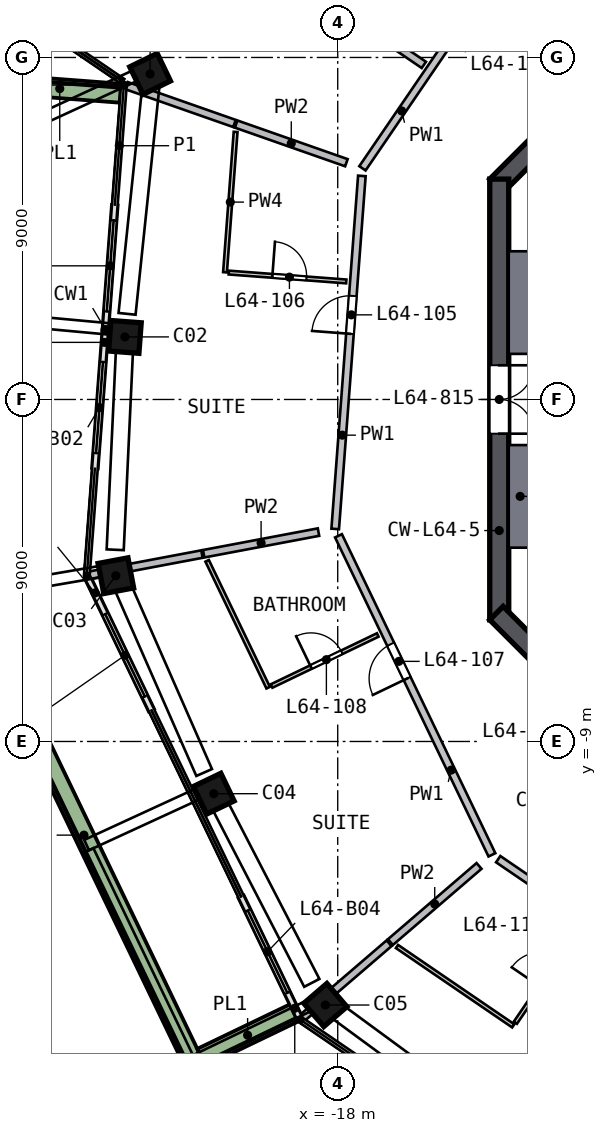
"""IFC4 building model, lengths in metres.
Left out: names, types, materials, properties, quantities, classifications, styles, units other than length and angle.
Written with IfcOpenShell. Run it as: python <this file> out.ifc"""

import sys

from ifc_helpers import new_model, si_unit, direction, frame, frame_2d, origin, origin_2d, place, context, subcontext, project, spatial, polyline, rectangle, outline, extrude, element, fill, save


model = new_model("IFC4")
c1 = context("Model", 3, precision=1e-05, world=origin(), true_north=direction((0.0, 1.0)))
c2 = subcontext(c1, "Body", "Model", "MODEL_VIEW")
j1 = project(units=[si_unit("LENGTHUNIT", "METRE"), si_unit("PLANEANGLEUNIT", "RADIAN")], contexts=[c1])
p1 = place(None, origin())
s1 = spatial("IfcSite", under=j1, at=p1, CompositionType="ELEMENT")
p2 = place(p1, origin())
s2 = spatial("IfcBuilding", under=s1, at=p2, CompositionType="ELEMENT")
p3 = place(p2, frame((0.0, 0.0, 259.5)))
s3 = spatial("IfcBuildingStorey", under=s2, at=p3, CompositionType="ELEMENT", Elevation=259.5)
p4 = place(p3, frame((-22.888, 8.699, 0.0), z_axis=(-0.040413341, -0.109196848, 0.993198273), x_axis=(-0.438378748, 0.895170757, 0.080581569)))
e1 = element("IfcColumn", 1, at=p4, inside=s3, PredefinedType="COLUMN", context=c2, shape_type="SweptSolid", body=[
    extrude(rectangle(XDim=0.8, YDim=0.8, at=origin_2d()), origin(), (0.0, 0.0, 1.0), 3.021),
])
p5 = place(p3, frame((-23.591, 1.782, 0.0), z_axis=(-0.007601181, -0.112238709, 0.9936522), x_axis=(-0.075549588, -0.990776389, -0.112491804)))
e2 = element("IfcColumn", 2, at=p5, inside=s3, PredefinedType="COLUMN", context=c2, shape_type="SweptSolid", body=[
    extrude(rectangle(XDim=0.8, YDim=0.8, at=origin_2d()), origin(), (0.0, 0.0, 1.0), 3.019),
])
p6 = place(p3, frame((-23.865, -4.501, 0.0), z_axis=(0.022391395, -0.113331177, 0.993304923), x_axis=(-0.184250053, 0.976067383, 0.115517882)))
e3 = element("IfcColumn", 3, at=p6, inside=s3, PredefinedType="COLUMN", context=c2, shape_type="SweptSolid", body=[
    extrude(rectangle(XDim=0.8, YDim=0.8, at=origin_2d()), origin(), (0.0, 0.0, 1.0), 3.02),
])
p7 = place(p3, frame((-21.322, -10.252, 0.0), z_axis=(0.049569338, -0.100998536, 0.993650933), x_axis=(0.430206945, -0.895692503, -0.112502994)))
e4 = element("IfcColumn", 4, at=p7, inside=s3, PredefinedType="COLUMN", context=c2, shape_type="SweptSolid", body=[
    extrude(rectangle(XDim=0.8, YDim=0.8, at=origin_2d()), origin(), (0.0, 0.0, 1.0), 3.019),
])
p8 = place(p3, frame((-18.417, -15.83, 0.0), z_axis=(0.075985477, -0.086979121, 0.993308029), x_axis=(-0.647132727, 0.75357881, 0.115491175)))
e5 = element("IfcColumn", 5, at=p8, inside=s3, PredefinedType="COLUMN", context=c2, shape_type="SweptSolid", body=[
    extrude(rectangle(XDim=0.8, YDim=0.8, at=origin_2d()), origin(), (0.0, 0.0, 1.0), 3.02),
])
p9 = place(p3, frame((-5.622, 13.823, 0.0), z_axis=(0.0, 0.0, 1.0), x_axis=(-0.707106781, -0.707106781, 0.0)))
e6 = element("IfcWall", 6, at=p9, inside=s3, PredefinedType="SHEAR", context=c2, shape_type="SweptSolid", body=[
    extrude(rectangle(XDim=11.598, YDim=0.5, at=frame_2d((5.799, 0.0))), origin(), (0.0, 0.0, 1.0), 3.5),
])
p10 = place(p3, frame((-13.75, 5.799, 0.0), z_axis=(0.0, 0.0, 1.0), x_axis=(0.0, -1.0, 0.0)))
e7 = element("IfcWall", 7, at=p10, inside=s3, PredefinedType="SHEAR", context=c2, shape_type="SweptSolid", body=[
    extrude(rectangle(XDim=11.598, YDim=0.5, at=frame_2d((5.799, 0.0))), origin(), (0.0, 0.0, 1.0), 3.5),
])
p11 = place(p10, frame((4.899, 0.0, 0.0)))
e8 = element("IfcOpeningElement", 8, at=p11, cuts=e7, PredefinedType="OPENING", context=c2, shape_type="SweptSolid", body=[
    extrude(rectangle(XDim=1.8, YDim=2.1, at=frame_2d((0.9, 1.05))), frame((0.0, 0.26, 0.0), z_axis=(0.0, -1.0, 0.0), x_axis=(1.0, 0.0, 0.0)), (0.0, 0.0, 1.0), 0.52),
])
p12 = place(p3, frame((-13.823, -5.622, 0.0), z_axis=(0.0, 0.0, 1.0), x_axis=(0.707106781, -0.707106781, 0.0)))
e9 = element("IfcWall", 9, at=p12, inside=s3, PredefinedType="SHEAR", context=c2, shape_type="SweptSolid", body=[
    extrude(rectangle(XDim=11.598, YDim=0.5, at=frame_2d((5.799, 0.0))), origin(), (0.0, 0.0, 1.0), 3.5),
])
p13 = place(p12, frame((2.099, 0.0, 0.0)))
e10 = element("IfcOpeningElement", 10, at=p13, cuts=e9, PredefinedType="OPENING", context=c2, shape_type="SweptSolid", body=[
    extrude(rectangle(XDim=1.2, YDim=2.1, at=frame_2d((0.6, 1.05))), frame((0.0, 0.26, 0.0), z_axis=(0.0, -1.0, 0.0), x_axis=(1.0, 0.0, 0.0)), (0.0, 0.0, 1.0), 0.52),
])
p14 = place(p3, frame((-23.866, 5.112, 0.0), z_axis=(0.0, 0.0, 1.0), x_axis=(-0.07531041, -0.997160139, 0.0)))
e11 = element("IfcWall", 11, at=p14, inside=s3, PredefinedType="SOLIDWALL", context=c2, shape_type="SweptSolid", body=[
    extrude(rectangle(XDim=3.3, YDim=0.15, at=frame_2d((1.65, 0.0))), origin(), (0.0, 0.0, 1.0), 2.935),
])
p15 = place(p14, frame((0.4, 0.0, 0.0)))
e12 = element("IfcOpeningElement", 12, at=p15, cuts=e11, PredefinedType="OPENING", context=c2, shape_type="SweptSolid", body=[
    extrude(rectangle(XDim=2.4, YDim=2.4, at=frame_2d((1.2, 1.2))), frame((0.0, 0.085, 0.0), z_axis=(0.0, -1.0, 0.0), x_axis=(1.0, 0.0, 0.0)), (0.0, 0.0, 1.0), 0.17),
])
p16 = place(p3, frame((-24.115, 1.822, 0.0), z_axis=(0.0, 0.0, 1.0), x_axis=(-0.075393578, -0.997153854, 0.0)))
e13 = element("IfcWall", 13, at=p16, inside=s3, PredefinedType="SOLIDWALL", context=c2, shape_type="SweptSolid", body=[
    extrude(rectangle(XDim=3.64, YDim=0.15, at=frame_2d((1.82, 0.0))), origin(), (0.0, 0.0, 1.0), 2.935),
])
p17 = place(p16, frame((0.84, 0.0, 0.0)))
e14 = element("IfcOpeningElement", 14, at=p17, cuts=e13, PredefinedType="OPENING", context=c2, shape_type="SweptSolid", body=[
    extrude(rectangle(XDim=2.4, YDim=2.4, at=frame_2d((1.2, 1.2))), frame((0.0, 0.085, 0.0), z_axis=(0.0, -1.0, 0.0), x_axis=(1.0, 0.0, 0.0)), (0.0, 0.0, 1.0), 0.17),
])
p18 = place(p3, frame((-24.568, -4.712, 0.0), z_axis=(0.0, 0.0, 1.0), x_axis=(0.433332155, -0.901234289, 0.0)))
e15 = element("IfcWall", 15, at=p18, inside=s3, PredefinedType="SOLIDWALL", context=c2, shape_type="SweptSolid", body=[
    extrude(rectangle(XDim=3.842, YDim=0.15, at=frame_2d((1.921, 0.0))), origin(), (0.0, 0.0, 1.0), 2.935),
])
p19 = place(p18, frame((1.042, 0.0, 0.0)))
e16 = element("IfcOpeningElement", 16, at=p19, cuts=e15, PredefinedType="OPENING", context=c2, shape_type="SweptSolid", body=[
    extrude(rectangle(XDim=2.4, YDim=2.4, at=frame_2d((1.2, 1.2))), frame((0.0, 0.085, 0.0), z_axis=(0.0, -1.0, 0.0), x_axis=(1.0, 0.0, 0.0)), (0.0, 0.0, 1.0), 0.17),
])
p20 = place(p3, frame((-20.54, -13.089, 0.0), z_axis=(0.0, 0.0, 1.0), x_axis=(0.433308583, -0.901245622, 0.0)))
e17 = element("IfcWall", 17, at=p20, inside=s3, PredefinedType="SOLIDWALL", context=c2, shape_type="SweptSolid", body=[
    extrude(rectangle(XDim=3.504, YDim=0.15, at=frame_2d((1.752, 0.0))), origin(), (0.0, 0.0, 1.0), 2.935),
])
p21 = place(p20, frame((0.4, 0.0, 0.0)))
e18 = element("IfcOpeningElement", 18, at=p21, cuts=e17, PredefinedType="OPENING", context=c2, shape_type="SweptSolid", body=[
    extrude(rectangle(XDim=2.4, YDim=2.4, at=frame_2d((1.2, 1.2))), frame((0.0, 0.085, 0.0), z_axis=(0.0, -1.0, 0.0), x_axis=(1.0, 0.0, 0.0)), (0.0, 0.0, 1.0), 0.17),
])
p22 = place(p3, frame((-23.72, 8.06, 0.0), z_axis=(0.0, 0.0, 1.0), x_axis=(-0.997158606, 0.075330696, 0.0)))
e19 = element("IfcWall", 19, at=p22, inside=s3, PredefinedType="SOLIDWALL", context=c2, shape_type="SweptSolid", body=[
    extrude(rectangle(XDim=3.199, YDim=0.5, at=frame_2d((1.599, 0.0))), origin(), (0.0, 0.0, 1.0), 0.7),
])
p23 = place(p3, frame((-27.651, -5.281, 0.0), z_axis=(0.0, 0.0, 1.0), x_axis=(0.433341118, -0.901229979, 0.0)))
e20 = element("IfcWall", 20, at=p23, inside=s3, PredefinedType="SOLIDWALL", context=c2, shape_type="SweptSolid", body=[
    extrude(rectangle(XDim=13.724, YDim=0.5, at=frame_2d((6.862, 0.0))), origin(), (0.0, 0.0, 1.0), 0.7),
])
p24 = place(p3, frame((-21.587, -17.315, 0.0), z_axis=(0.0, 0.0, 1.0), x_axis=(0.901213701, 0.433374971, 0.0)))
e21 = element("IfcWall", 21, at=p24, inside=s3, PredefinedType="SOLIDWALL", context=c2, shape_type="SweptSolid", body=[
    extrude(rectangle(XDim=2.699, YDim=0.5, at=frame_2d((1.35, 0.0))), origin(), (0.0, 0.0, 1.0), 0.7),
])
p25 = place(p3, origin())
e22 = element("IfcWall", 22, at=p25, inside=s3, PredefinedType="SOLIDWALL", context=c2, shape_type="SweptSolid", body=[
    extrude(outline(polyline([(-13.5, 3.9), (-9.9, 3.9), (-9.9, 3.7), (-12.9, 3.7), (-12.9, 1.4), (-9.9, 1.4), (-9.9, 1.2), (-13.5, 1.2), (-13.5, 3.9)])), origin(), (0.0, 0.0, 1.0), 3.0),
])
p26 = place(p3, origin())
e23 = element("IfcWall", 23, at=p26, inside=s3, PredefinedType="SOLIDWALL", context=c2, shape_type="SweptSolid", body=[
    extrude(outline(polyline([(-13.5, -3.9), (-13.5, -1.2), (-9.9, -1.2), (-9.9, -1.4), (-12.9, -1.4), (-12.9, -3.7), (-9.9, -3.7), (-9.9, -3.9), (-13.5, -3.9)])), origin(), (0.0, 0.0, 1.0), 3.0),
])
p27 = place(p3, frame((-18.066, -3.407, 0.0), z_axis=(0.0, 0.0, 1.0), x_axis=(0.075339772, 0.997157921, 0.0)))
e24 = element("IfcWall", 24, at=p27, inside=s3, PredefinedType="SOLIDWALL", context=c2, shape_type="SweptSolid", body=[
    extrude(rectangle(XDim=9.316, YDim=0.2, at=frame_2d((4.658, 0.0))), origin(), (0.0, 0.0, 1.0), 3.0),
])
p28 = place(p27, frame((5.15, 0.0, 0.0)))
e25 = element("IfcOpeningElement", 25, at=p28, cuts=e24, PredefinedType="OPENING", context=c2, shape_type="SweptSolid", body=[
    extrude(rectangle(XDim=1.0, YDim=2.1, at=frame_2d((0.5, 1.05))), frame((0.0, 0.11, 0.0), z_axis=(0.0, -1.0, 0.0), x_axis=(1.0, 0.0, 0.0)), (0.0, 0.0, 1.0), 0.22),
])
p29 = place(p3, frame((-13.942, -11.984, 0.0), z_axis=(0.0, 0.0, 1.0), x_axis=(-0.433323906, 0.901238255, 0.0)))
e26 = element("IfcWall", 26, at=p29, inside=s3, PredefinedType="SOLIDWALL", context=c2, shape_type="SweptSolid", body=[
    extrude(rectangle(XDim=9.317, YDim=0.2, at=frame_2d((4.658, 0.0))), origin(), (0.0, 0.0, 1.0), 3.0),
])
p30 = place(p29, frame((5.15, 0.0, 0.0)))
e27 = element("IfcOpeningElement", 27, at=p30, cuts=e26, PredefinedType="OPENING", context=c2, shape_type="SweptSolid", body=[
    extrude(rectangle(XDim=1.0, YDim=2.1, at=frame_2d((0.5, 1.05))), frame((0.0, 0.11, 0.0), z_axis=(0.0, -1.0, 0.0), x_axis=(1.0, 0.0, 0.0)), (0.0, 0.0, 1.0), 0.22),
])
p31 = place(p3, frame((-17.349, 6.083, 0.0), z_axis=(0.0, 0.0, 1.0), x_axis=(0.563804288, 0.825908424, 0.0)))
e28 = element("IfcWall", 28, at=p31, inside=s3, PredefinedType="SOLIDWALL", context=c2, shape_type="SweptSolid", body=[
    extrude(rectangle(XDim=9.316, YDim=0.2, at=frame_2d((4.658, 0.0))), origin(), (0.0, 0.0, 1.0), 3.0),
])
p32 = place(p31, frame((3.859, 0.0, 0.0)))
e29 = element("IfcOpeningElement", 29, at=p32, cuts=e28, PredefinedType="OPENING", context=c2, shape_type="SweptSolid", body=[
    extrude(rectangle(XDim=1.8, YDim=2.1, at=frame_2d((0.9, 1.05))), frame((0.0, 0.11, 0.0), z_axis=(0.0, -1.0, 0.0), x_axis=(1.0, 0.0, 0.0)), (0.0, 0.0, 1.0), 0.22),
])
p33 = place(p3, frame((-6.083, -17.349, 0.0), z_axis=(0.0, 0.0, 1.0), x_axis=(-0.825908424, 0.563804288, 0.0)))
e30 = element("IfcWall", 30, at=p33, inside=s3, PredefinedType="SOLIDWALL", context=c2, shape_type="SweptSolid", body=[
    extrude(rectangle(XDim=9.316, YDim=0.2, at=frame_2d((4.658, 0.0))), origin(), (0.0, 0.0, 1.0), 3.0),
])
p34 = place(p33, frame((5.15, 0.0, 0.0)))
e31 = element("IfcOpeningElement", 31, at=p34, cuts=e30, PredefinedType="OPENING", context=c2, shape_type="SweptSolid", body=[
    extrude(rectangle(XDim=1.0, YDim=2.1, at=frame_2d((0.5, 1.05))), frame((0.0, 0.11, 0.0), z_axis=(0.0, -1.0, 0.0), x_axis=(1.0, 0.0, 0.0)), (0.0, 0.0, 1.0), 0.22),
])
p35 = place(p3, frame((-21.573, -4.068, 0.0), z_axis=(0.0, 0.0, 1.0), x_axis=(-0.982673358, -0.185345817, 0.0)))
e32 = element("IfcWall", 32, at=p35, inside=s3, PredefinedType="SOLIDWALL", context=c2, shape_type="SweptSolid", body=[
    extrude(rectangle(XDim=3.011, YDim=0.2, at=frame_2d((1.506, 0.0))), origin(), (0.0, 0.0, 1.0), 3.0),
])
p36 = place(p3, frame((-20.716, 7.263, 0.0), z_axis=(0.0, 0.0, 1.0), x_axis=(-0.94368127, 0.330855951, 0.0)))
e33 = element("IfcWall", 33, at=p36, inside=s3, PredefinedType="SOLIDWALL", context=c2, shape_type="SweptSolid", body=[
    extrude(rectangle(XDim=3.011, YDim=0.2, at=frame_2d((1.506, 0.0))), origin(), (0.0, 0.0, 1.0), 3.0),
])
p37 = place(p3, frame((-18.506, -3.49, 0.0), z_axis=(0.0, 0.0, 1.0), x_axis=(-0.982674754, -0.185338414, 0.0)))
e34 = element("IfcWall", 34, at=p37, inside=s3, PredefinedType="SOLIDWALL", context=c2, shape_type="SweptSolid", body=[
    extrude(rectangle(XDim=3.074, YDim=0.2, at=frame_2d((1.537, 0.0))), origin(), (0.0, 0.0, 1.0), 3.0),
])
p38 = place(p3, frame((-15.733, 8.804, 0.0), z_axis=(0.0, 0.0, 1.0), x_axis=(-0.825907835, 0.563805151, 0.0)))
e35 = element("IfcWall", 35, at=p38, inside=s3, PredefinedType="SOLIDWALL", context=c2, shape_type="SweptSolid", body=[
    extrude(rectangle(XDim=10.302, YDim=0.2, at=frame_2d((5.151, 0.0))), origin(), (0.0, 0.0, 1.0), 3.0),
])
p39 = place(p38, frame((2.95, 0.0, 0.0)))
e36 = element("IfcOpeningElement", 36, at=p39, cuts=e35, PredefinedType="OPENING", context=c2, shape_type="SweptSolid", body=[
    extrude(rectangle(XDim=1.0, YDim=2.1, at=frame_2d((0.5, 1.05))), frame((0.0, 0.11, 0.0), z_axis=(0.0, -1.0, 0.0), x_axis=(1.0, 0.0, 0.0)), (0.0, 0.0, 1.0), 0.22),
])
p40 = place(p3, frame((-17.771, 6.23, 0.0), z_axis=(0.0, 0.0, 1.0), x_axis=(-0.943678725, 0.33086321, 0.0)))
e37 = element("IfcWall", 37, at=p40, inside=s3, PredefinedType="SOLIDWALL", context=c2, shape_type="SweptSolid", body=[
    extrude(rectangle(XDim=3.075, YDim=0.2, at=frame_2d((1.537, 0.0))), origin(), (0.0, 0.0, 1.0), 3.0),
])
p41 = place(p3, frame((-16.648, -14.31, 0.0), z_axis=(0.0, 0.0, 1.0), x_axis=(-0.758397568, -0.651792244, 0.0)))
e38 = element("IfcWall", 38, at=p41, inside=s3, PredefinedType="SOLIDWALL", context=c2, shape_type="SweptSolid", body=[
    extrude(rectangle(XDim=3.011, YDim=0.2, at=frame_2d((1.506, 0.0))), origin(), (0.0, 0.0, 1.0), 3.0),
])
p42 = place(p3, frame((-14.281, -12.275, 0.0), z_axis=(0.0, 0.0, 1.0), x_axis=(-0.758375939, -0.65181741, 0.0)))
e39 = element("IfcWall", 39, at=p42, inside=s3, PredefinedType="SOLIDWALL", context=c2, shape_type="SweptSolid", body=[
    extrude(rectangle(XDim=3.075, YDim=0.2, at=frame_2d((1.537, 0.0))), origin(), (0.0, 0.0, 1.0), 3.0),
])
p43 = place(p3, frame((-20.966, 3.347, 0.0), z_axis=(0.0, 0.0, 1.0), x_axis=(0.075340523, 0.997157864, 0.0)))
e40 = element("IfcWall", 40, at=p43, inside=s3, PredefinedType="PARTITIONING", context=c2, shape_type="SweptSolid", body=[
    extrude(rectangle(XDim=3.704, YDim=0.1, at=frame_2d((1.852, 0.0))), origin(), (0.0, 0.0, 1.0), 3.0),
])
p44 = place(p3, frame((-19.83, -7.584, 0.0), z_axis=(0.0, 0.0, 1.0), x_axis=(-0.433371651, 0.901215297, 0.0)))
e41 = element("IfcWall", 41, at=p44, inside=s3, PredefinedType="PARTITIONING", context=c2, shape_type="SweptSolid", body=[
    extrude(rectangle(XDim=3.704, YDim=0.1, at=frame_2d((1.852, 0.0))), origin(), (0.0, 0.0, 1.0), 3.0),
])
p45 = place(p3, frame((-20.866, 3.34, 0.0), z_axis=(0.0, 0.0, 1.0), x_axis=(0.99716189, -0.075287219, 0.0)))
e42 = element("IfcWall", 42, at=p45, inside=s3, PredefinedType="PARTITIONING", context=c2, shape_type="SweptSolid", body=[
    extrude(rectangle(XDim=3.1, YDim=0.1, at=frame_2d((1.55, 0.0))), origin(), (0.0, 0.0, 1.0), 3.0),
])
p46 = place(p45, frame((1.15, 0.0, 0.0)))
e43 = element("IfcOpeningElement", 43, at=p46, cuts=e42, PredefinedType="OPENING", context=c2, shape_type="SweptSolid", body=[
    extrude(rectangle(XDim=0.9, YDim=2.1, at=frame_2d((0.45, 1.05))), frame((0.0, 0.06, 0.0), z_axis=(0.0, -1.0, 0.0), x_axis=(1.0, 0.0, 0.0)), (0.0, 0.0, 1.0), 0.12),
])
p47 = place(p3, frame((-19.74, -7.541, 0.0), z_axis=(0.0, 0.0, 1.0), x_axis=(0.901204512, 0.433394078, 0.0)))
e44 = element("IfcWall", 44, at=p47, inside=s3, PredefinedType="PARTITIONING", context=c2, shape_type="SweptSolid", body=[
    extrude(rectangle(XDim=3.1, YDim=0.1, at=frame_2d((1.55, 0.0))), origin(), (0.0, 0.0, 1.0), 3.0),
])
p48 = place(p47, frame((1.15, 0.0, 0.0)))
e45 = element("IfcOpeningElement", 45, at=p48, cuts=e44, PredefinedType="OPENING", context=c2, shape_type="SweptSolid", body=[
    extrude(rectangle(XDim=0.9, YDim=2.1, at=frame_2d((0.45, 1.05))), frame((0.0, 0.06, 0.0), z_axis=(0.0, -1.0, 0.0), x_axis=(1.0, 0.0, 0.0)), (0.0, 0.0, 1.0), 0.12),
])
p49 = place(p3, frame((-13.382, -16.483, 0.0), z_axis=(0.0, 0.0, 1.0), x_axis=(-0.825895308, 0.563823501, 0.0)))
e46 = element("IfcWall", 46, at=p49, inside=s3, PredefinedType="PARTITIONING", context=c2, shape_type="SweptSolid", body=[
    extrude(rectangle(XDim=3.704, YDim=0.1, at=frame_2d((1.852, 0.0))), origin(), (0.0, 0.0, 1.0), 3.0),
])
p50 = place(p3, frame((-13.325, -16.401, 0.0), z_axis=(0.0, 0.0, 1.0), x_axis=(0.563808375, 0.825905634, 0.0)))
e47 = element("IfcWall", 47, at=p50, inside=s3, PredefinedType="PARTITIONING", context=c2, shape_type="SweptSolid", body=[
    extrude(rectangle(XDim=3.1, YDim=0.1, at=frame_2d((1.55, 0.0))), origin(), (0.0, 0.0, 1.0), 3.0),
])
p51 = place(p50, frame((1.15, 0.0, 0.0)))
e48 = element("IfcOpeningElement", 48, at=p51, cuts=e47, PredefinedType="OPENING", context=c2, shape_type="SweptSolid", body=[
    extrude(rectangle(XDim=0.9, YDim=2.1, at=frame_2d((0.45, 1.05))), frame((0.0, 0.06, 0.0), z_axis=(0.0, -1.0, 0.0), x_axis=(1.0, 0.0, 0.0)), (0.0, 0.0, 1.0), 0.12),
])
p52 = place(p15, origin())
e49 = element("IfcDoor", 49, at=p52, inside=s3, OperationType="SLIDING_TO_RIGHT", PredefinedType="DOOR", context=c2, shape_type="SweptSolid", body=[
    extrude(rectangle(XDim=2.4, YDim=2.4, at=frame_2d((1.2, 1.2))), frame((0.0, 0.025, 0.0), z_axis=(0.0, -1.0, 0.0), x_axis=(1.0, 0.0, 0.0)), (0.0, 0.0, 1.0), 0.05),
])
fill(e12, e49)
p53 = place(p17, origin())
e50 = element("IfcDoor", 50, at=p53, inside=s3, OperationType="SLIDING_TO_LEFT", PredefinedType="DOOR", context=c2, shape_type="SweptSolid", body=[
    extrude(rectangle(XDim=2.4, YDim=2.4, at=frame_2d((1.2, 1.2))), frame((0.0, 0.025, 0.0), z_axis=(0.0, -1.0, 0.0), x_axis=(1.0, 0.0, 0.0)), (0.0, 0.0, 1.0), 0.05),
])
fill(e14, e50)
p54 = place(p19, origin())
e51 = element("IfcDoor", 51, at=p54, inside=s3, OperationType="SLIDING_TO_LEFT", PredefinedType="DOOR", context=c2, shape_type="SweptSolid", body=[
    extrude(rectangle(XDim=2.4, YDim=2.4, at=frame_2d((1.2, 1.2))), frame((0.0, 0.025, 0.0), z_axis=(0.0, -1.0, 0.0), x_axis=(1.0, 0.0, 0.0)), (0.0, 0.0, 1.0), 0.05),
])
fill(e16, e51)
p55 = place(p21, origin())
e52 = element("IfcDoor", 52, at=p55, inside=s3, OperationType="SLIDING_TO_RIGHT", PredefinedType="DOOR", context=c2, shape_type="SweptSolid", body=[
    extrude(rectangle(XDim=2.4, YDim=2.4, at=frame_2d((1.2, 1.2))), frame((0.0, 0.025, 0.0), z_axis=(0.0, -1.0, 0.0), x_axis=(1.0, 0.0, 0.0)), (0.0, 0.0, 1.0), 0.05),
])
fill(e18, e52)
p56 = place(p11, origin())
e53 = element("IfcDoor", 53, at=p56, inside=s3, OperationType="DOUBLE_DOOR_SINGLE_SWING", PredefinedType="DOOR", context=c2, shape_type="SweptSolid", body=[
    extrude(rectangle(XDim=1.8, YDim=2.1, at=frame_2d((0.9, 1.05))), frame((0.0, 0.025, 0.0), z_axis=(0.0, -1.0, 0.0), x_axis=(1.0, 0.0, 0.0)), (0.0, 0.0, 1.0), 0.05),
])
fill(e8, e53)
p57 = place(p28, origin())
e54 = element("IfcDoor", 54, at=p57, inside=s3, OperationType="SINGLE_SWING_LEFT", PredefinedType="DOOR", context=c2, shape_type="SweptSolid", body=[
    extrude(rectangle(XDim=1.0, YDim=2.1, at=frame_2d((0.5, 1.05))), frame((0.0, 0.025, 0.0), z_axis=(0.0, -1.0, 0.0), x_axis=(1.0, 0.0, 0.0)), (0.0, 0.0, 1.0), 0.05),
])
fill(e25, e54)
p58 = place(p46, origin())
e55 = element("IfcDoor", 55, at=p58, inside=s3, OperationType="SINGLE_SWING_LEFT", PredefinedType="DOOR", context=c2, shape_type="SweptSolid", body=[
    extrude(rectangle(XDim=0.9, YDim=2.1, at=frame_2d((0.45, 1.05))), frame((0.0, 0.025, 0.0), z_axis=(0.0, -1.0, 0.0), x_axis=(1.0, 0.0, 0.0)), (0.0, 0.0, 1.0), 0.05),
])
fill(e43, e55)
p59 = place(p30, origin())
e56 = element("IfcDoor", 56, at=p59, inside=s3, OperationType="SINGLE_SWING_LEFT", PredefinedType="DOOR", context=c2, shape_type="SweptSolid", body=[
    extrude(rectangle(XDim=1.0, YDim=2.1, at=frame_2d((0.5, 1.05))), frame((0.0, 0.025, 0.0), z_axis=(0.0, -1.0, 0.0), x_axis=(1.0, 0.0, 0.0)), (0.0, 0.0, 1.0), 0.05),
])
fill(e27, e56)
p60 = place(p48, origin())
e57 = element("IfcDoor", 57, at=p60, inside=s3, OperationType="SINGLE_SWING_LEFT", PredefinedType="DOOR", context=c2, shape_type="SweptSolid", body=[
    extrude(rectangle(XDim=0.9, YDim=2.1, at=frame_2d((0.45, 1.05))), frame((0.0, 0.025, 0.0), z_axis=(0.0, -1.0, 0.0), x_axis=(1.0, 0.0, 0.0)), (0.0, 0.0, 1.0), 0.05),
])
fill(e45, e57)
save(model, sys.argv[1])
